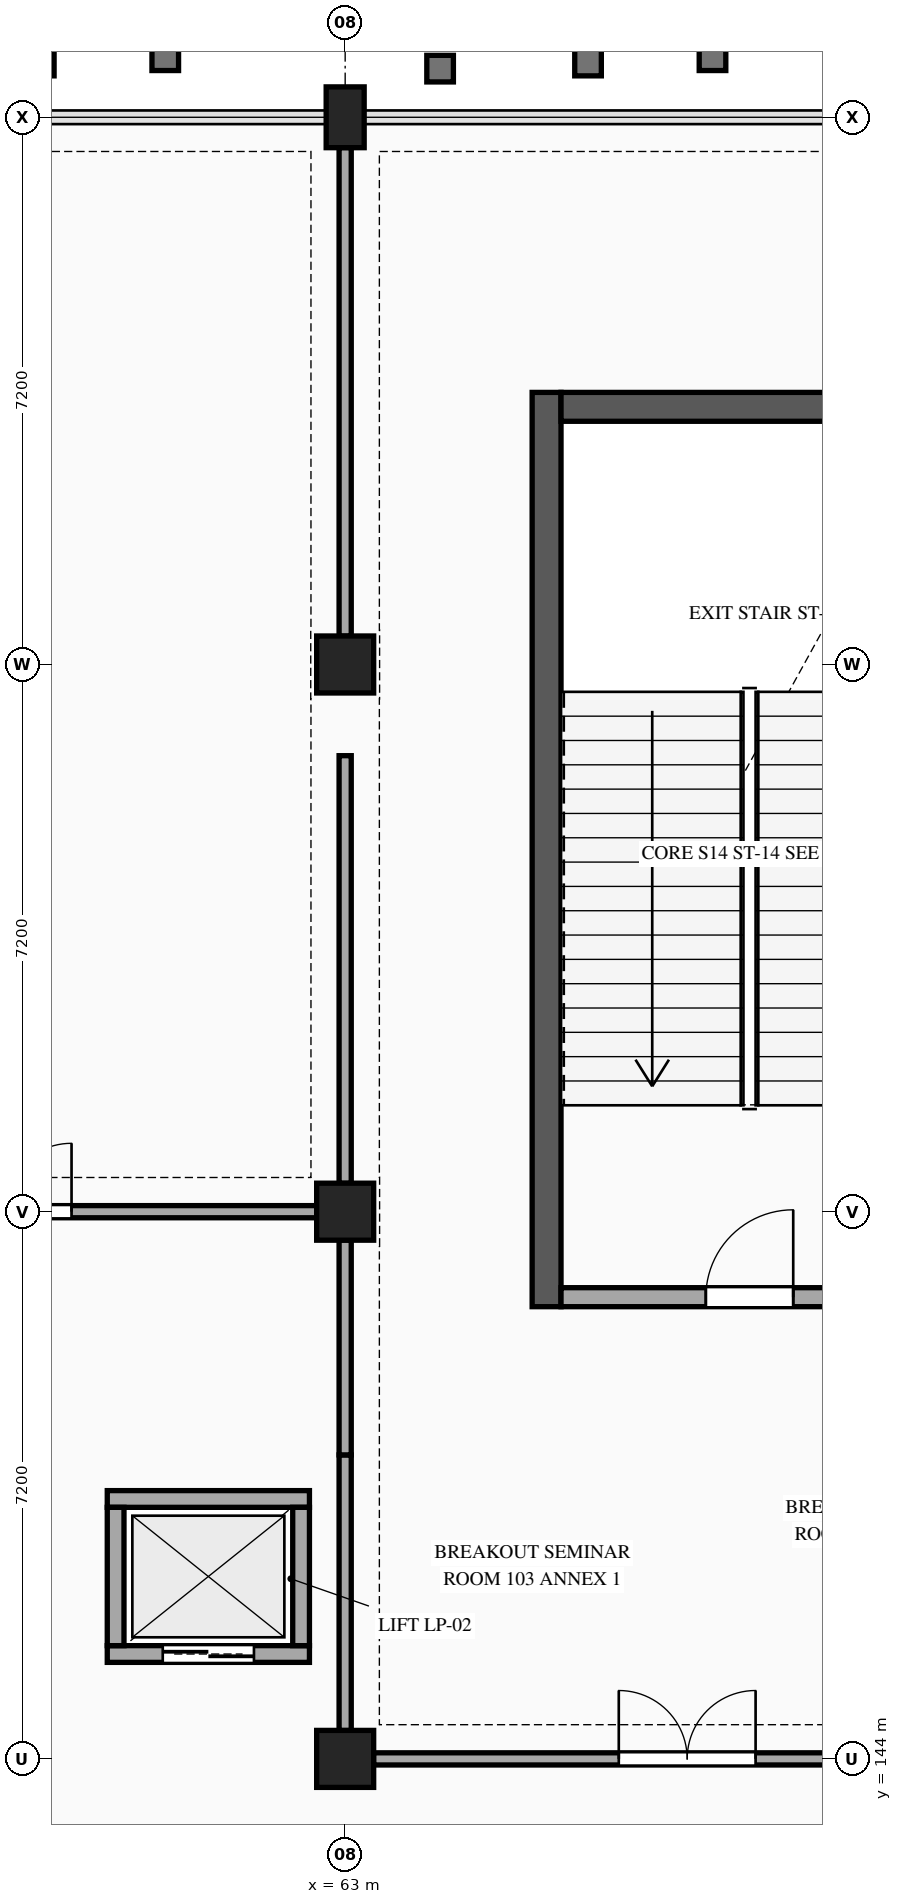
"""IFC4 building model, lengths in metres.
Left out: names, types, materials, properties, quantities, classifications, styles, units other than length and angle.
Written with IfcOpenShell. Run it as: python <this file> out.ifc"""

import sys

from ifc_helpers import new_model, si_unit, direction, frame, frame_2d, origin, origin_2d, place, context, subcontext, project, spatial, rectangle, extrude, element, fill, save


model = new_model("IFC4")
c1 = context("Model", 3, precision=1e-05, world=origin(), true_north=direction((0.0, 1.0)))
c2 = subcontext(c1, "Body", "Model", "MODEL_VIEW")
j1 = project(units=[si_unit("LENGTHUNIT", "METRE"), si_unit("PLANEANGLEUNIT", "RADIAN")], contexts=[c1])
p1 = place(None, origin())
s1 = spatial("IfcSite", under=j1, at=p1, CompositionType="ELEMENT")
p2 = place(p1, origin())
s2 = spatial("IfcBuilding", under=s1, at=p2, CompositionType="ELEMENT")
p3 = place(p2, frame((0.0, 0.0, 5.4)))
s3 = spatial("IfcBuildingStorey", under=s2, at=p3, CompositionType="ELEMENT", Elevation=5.4)
for number, where, z_axis, x_axis in (
    (1, (63.0, 144.0, 0.0), (0.0, 0.0, 1.0), (1.0, 0.0, 0.0)),
    (2, (63.0, 151.2, 0.0), (0.0, 0.0, 1.0), (1.0, 0.0, 0.0)),
    (3, (63.0, 158.4, 0.0), (0.0, 0.0, 1.0), (1.0, 0.0, 0.0)),
):
    element("IfcColumn", number, at=place(p3, frame(where, z_axis=z_axis, x_axis=x_axis)), inside=s3, PredefinedType="COLUMN", context=c2, shape_type="SweptSolid", body=[
        extrude(rectangle(XDim=0.75, YDim=0.75, at=origin_2d()), origin(), (0.0, 0.0, 1.0), 5.4),
    ])
p4 = place(p3, frame((63.0, 165.6, 0.0), z_axis=(0.0, 0.0, 1.0), x_axis=(1.0, 0.0, 0.0)))
e4 = element("IfcColumn", 4, at=p4, inside=s3, PredefinedType="COLUMN", context=c2, shape_type="SweptSolid", body=[
    extrude(rectangle(XDim=0.5, YDim=0.8, at=origin_2d()), origin(), (0.0, 0.0, 1.0), 5.4),
])
p5 = place(p3, frame((65.65, 149.95, 0.0), z_axis=(0.0, 0.0, 1.0), x_axis=(0.0, 1.0, 0.0)))
e5 = element("IfcWall", 5, at=p5, inside=s3, PredefinedType="SHEAR", context=c2, shape_type="SweptSolid", body=[
    extrude(rectangle(XDim=12.03, YDim=0.38, at=frame_2d((6.015, 0.0))), origin(), (0.0, 0.0, 1.0), 5.12),
])
p6 = place(p3, frame((65.84, 161.79, 0.0), z_axis=(0.0, 0.0, 1.0), x_axis=(1.0, 0.0, 0.0)))
e6 = element("IfcWall", 6, at=p6, inside=s3, PredefinedType="SHEAR", context=c2, shape_type="SweptSolid", body=[
    extrude(rectangle(XDim=4.96, YDim=0.38, at=frame_2d((2.48, 0.0))), origin(), (0.0, 0.0, 1.0), 5.12),
])
p7 = place(p3, frame((59.87, 145.38, 0.0), z_axis=(0.0, 0.0, 1.0), x_axis=(1.0, 0.0, 0.0)))
e7 = element("IfcWall", 7, at=p7, inside=s3, PredefinedType="STANDARD", context=c2, shape_type="SweptSolid", body=[
    extrude(rectangle(XDim=2.66, YDim=0.22, at=frame_2d((1.33, 0.0))), origin(), (0.0, 0.0, 1.0), 5.12),
])
p8 = place(p7, frame((0.73, 0.0, 0.0)))
e8 = element("IfcOpeningElement", 8, at=p8, cuts=e7, PredefinedType="OPENING", context=c2, shape_type="SweptSolid", body=[
    extrude(rectangle(XDim=1.2, YDim=2.2, at=frame_2d((0.6, 1.1))), frame((0.0, 0.12, 0.0), z_axis=(0.0, -1.0, 0.0), x_axis=(1.0, 0.0, 0.0)), (0.0, 0.0, 1.0), 0.24),
])
p9 = place(p3, frame((62.53, 147.42, 0.0), z_axis=(0.0, 0.0, 1.0), x_axis=(-1.0, 0.0, 0.0)))
e9 = element("IfcWall", 9, at=p9, inside=s3, PredefinedType="STANDARD", context=c2, shape_type="SweptSolid", body=[
    extrude(rectangle(XDim=2.66, YDim=0.22, at=frame_2d((1.33, 0.0))), origin(), (0.0, 0.0, 1.0), 5.12),
])
for number, where, z_axis, x_axis in (
    (10, (59.98, 147.31, 0.0), (0.0, 0.0, 1.0), (0.0, -1.0, 0.0)),
    (11, (62.42, 145.49, 0.0), (0.0, 0.0, 1.0), (0.0, 1.0, 0.0)),
):
    element("IfcWall", number, at=place(p3, frame(where, z_axis=z_axis, x_axis=x_axis)), inside=s3, PredefinedType="STANDARD", context=c2, shape_type="SweptSolid", body=[
        extrude(rectangle(XDim=1.82, YDim=0.22, at=frame_2d((0.91, 0.0))), origin(), (0.0, 0.0, 1.0), 5.12),
    ])
p10 = place(p3, frame((65.84, 150.075, 0.0), z_axis=(0.0, 0.0, 1.0), x_axis=(1.0, 0.0, 0.0)))
e12 = element("IfcWall", 12, at=p10, inside=s3, PredefinedType="STANDARD", context=c2, shape_type="SweptSolid", body=[
    extrude(rectangle(XDim=4.96, YDim=0.25, at=frame_2d((2.48, 0.0))), origin(), (0.0, 0.0, 1.0), 5.12),
])
p11 = place(p10, frame((1.905, 0.0, 0.0)))
e13 = element("IfcOpeningElement", 13, at=p11, cuts=e12, PredefinedType="OPENING", context=c2, shape_type="SweptSolid", body=[
    extrude(rectangle(XDim=1.15, YDim=2.2, at=frame_2d((0.575, 1.1))), frame((0.0, 0.135, 0.0), z_axis=(0.0, -1.0, 0.0), x_axis=(1.0, 0.0, 0.0)), (0.0, 0.0, 1.0), 0.27),
])
p12 = place(p3, frame((63.373, 144.0, 0.0), z_axis=(0.0, 0.0, 1.0), x_axis=(1.0, 0.0, 0.0)))
e14 = element("IfcWall", 14, at=p12, inside=s3, PredefinedType="PARTITIONING", context=c2, shape_type="SweptSolid", body=[
    extrude(rectangle(XDim=8.254, YDim=0.16, at=frame_2d((4.127, 0.0))), origin(), (0.0, 0.0, 1.0), 4.498),
])
p13 = place(p12, frame((3.227, 0.0, 0.0)))
e15 = element("IfcOpeningElement", 15, at=p13, cuts=e14, PredefinedType="OPENING", context=c2, shape_type="SweptSolid", body=[
    extrude(rectangle(XDim=1.8, YDim=2.25, at=frame_2d((0.9, 1.125))), frame((0.0, 0.09, 0.0), z_axis=(0.0, -1.0, 0.0), x_axis=(1.0, 0.0, 0.0)), (0.0, 0.0, 1.0), 0.18),
])
p14 = place(p3, frame((54.373, 151.2, 0.0), z_axis=(0.0, 0.0, 1.0), x_axis=(1.0, 0.0, 0.0)))
e16 = element("IfcWall", 16, at=p14, inside=s3, PredefinedType="PARTITIONING", context=c2, shape_type="SweptSolid", body=[
    extrude(rectangle(XDim=8.254, YDim=0.16, at=frame_2d((4.127, 0.0))), origin(), (0.0, 0.0, 1.0), 4.498),
])
p15 = place(p14, frame((3.227, 0.0, 0.0)))
e17 = element("IfcOpeningElement", 17, at=p15, cuts=e16, PredefinedType="OPENING", context=c2, shape_type="SweptSolid", body=[
    extrude(rectangle(XDim=1.8, YDim=2.25, at=frame_2d((0.9, 1.125))), frame((0.0, 0.09, 0.0), z_axis=(0.0, -1.0, 0.0), x_axis=(1.0, 0.0, 0.0)), (0.0, 0.0, 1.0), 0.18),
])
p16 = place(p3, frame((63.0, 144.373, 0.0), z_axis=(0.0, 0.0, 1.0), x_axis=(0.0, 1.0, 0.0)))
e18 = element("IfcWall", 18, at=p16, inside=s3, PredefinedType="PARTITIONING", context=c2, shape_type="SweptSolid", body=[
    extrude(rectangle(XDim=3.627, YDim=0.16, at=frame_2d((1.813, 0.0))), origin(), (0.0, 0.0, 1.0), 4.508),
])
p17 = place(p3, frame((63.0, 148.0, 0.0), z_axis=(0.0, 0.0, 1.0), x_axis=(0.0, 1.0, 0.0)))
e19 = element("IfcWall", 19, at=p17, inside=s3, PredefinedType="PARTITIONING", context=c2, shape_type="SweptSolid", body=[
    extrude(rectangle(XDim=2.827, YDim=0.16, at=frame_2d((1.414, 0.0))), origin(), (0.0, 0.0, 1.0), 4.508),
])
p18 = place(p3, frame((63.0, 151.573, 0.0), z_axis=(0.0, 0.0, 1.0), x_axis=(0.0, 1.0, 0.0)))
e20 = element("IfcWall", 20, at=p18, inside=s3, PredefinedType="PARTITIONING", context=c2, shape_type="SweptSolid", body=[
    extrude(rectangle(XDim=5.627, YDim=0.16, at=frame_2d((2.813, 0.0))), origin(), (0.0, 0.0, 1.0), 4.508),
])
p19 = place(p3, frame((63.0, 158.773, 0.0), z_axis=(0.0, 0.0, 1.0), x_axis=(0.0, 1.0, 0.0)))
e21 = element("IfcWall", 21, at=p19, inside=s3, PredefinedType="PARTITIONING", context=c2, shape_type="SweptSolid", body=[
    extrude(rectangle(XDim=6.429, YDim=0.16, at=frame_2d((3.214, 0.0))), origin(), (0.0, 0.0, 1.0), 4.508),
])
p20 = place(p8, origin())
e22 = element("IfcDoor", 22, at=p20, inside=s3, OperationType="DOUBLE_DOOR_SLIDING", PredefinedType="DOOR", context=c2, shape_type="SweptSolid", body=[
    extrude(rectangle(XDim=1.2, YDim=2.2, at=frame_2d((0.6, 1.1))), frame((0.0, 0.025, 0.0), z_axis=(0.0, -1.0, 0.0), x_axis=(1.0, 0.0, 0.0)), (0.0, 0.0, 1.0), 0.05),
])
fill(e8, e22)
p21 = place(p11, origin())
e23 = element("IfcDoor", 23, at=p21, inside=s3, OperationType="SINGLE_SWING_RIGHT", PredefinedType="DOOR", context=c2, shape_type="SweptSolid", body=[
    extrude(rectangle(XDim=1.15, YDim=2.2, at=frame_2d((0.575, 1.1))), frame((0.0, 0.025, 0.0), z_axis=(0.0, -1.0, 0.0), x_axis=(1.0, 0.0, 0.0)), (0.0, 0.0, 1.0), 0.05),
])
fill(e13, e23)
p22 = place(p13, origin())
e24 = element("IfcDoor", 24, at=p22, inside=s3, OperationType="DOUBLE_DOOR_SINGLE_SWING", PredefinedType="DOOR", context=c2, shape_type="SweptSolid", body=[
    extrude(rectangle(XDim=1.8, YDim=2.25, at=frame_2d((0.9, 1.125))), frame((0.0, 0.025, 0.0), z_axis=(0.0, -1.0, 0.0), x_axis=(1.0, 0.0, 0.0)), (0.0, 0.0, 1.0), 0.05),
])
fill(e15, e24)
p23 = place(p15, origin())
e25 = element("IfcDoor", 25, at=p23, inside=s3, OperationType="DOUBLE_DOOR_SINGLE_SWING", PredefinedType="DOOR", context=c2, shape_type="SweptSolid", body=[
    extrude(rectangle(XDim=1.8, YDim=2.25, at=frame_2d((0.9, 1.125))), frame((0.0, 0.025, 0.0), z_axis=(0.0, -1.0, 0.0), x_axis=(1.0, 0.0, 0.0)), (0.0, 0.0, 1.0), 0.05),
])
fill(e17, e25)
save(model, sys.argv[1])
